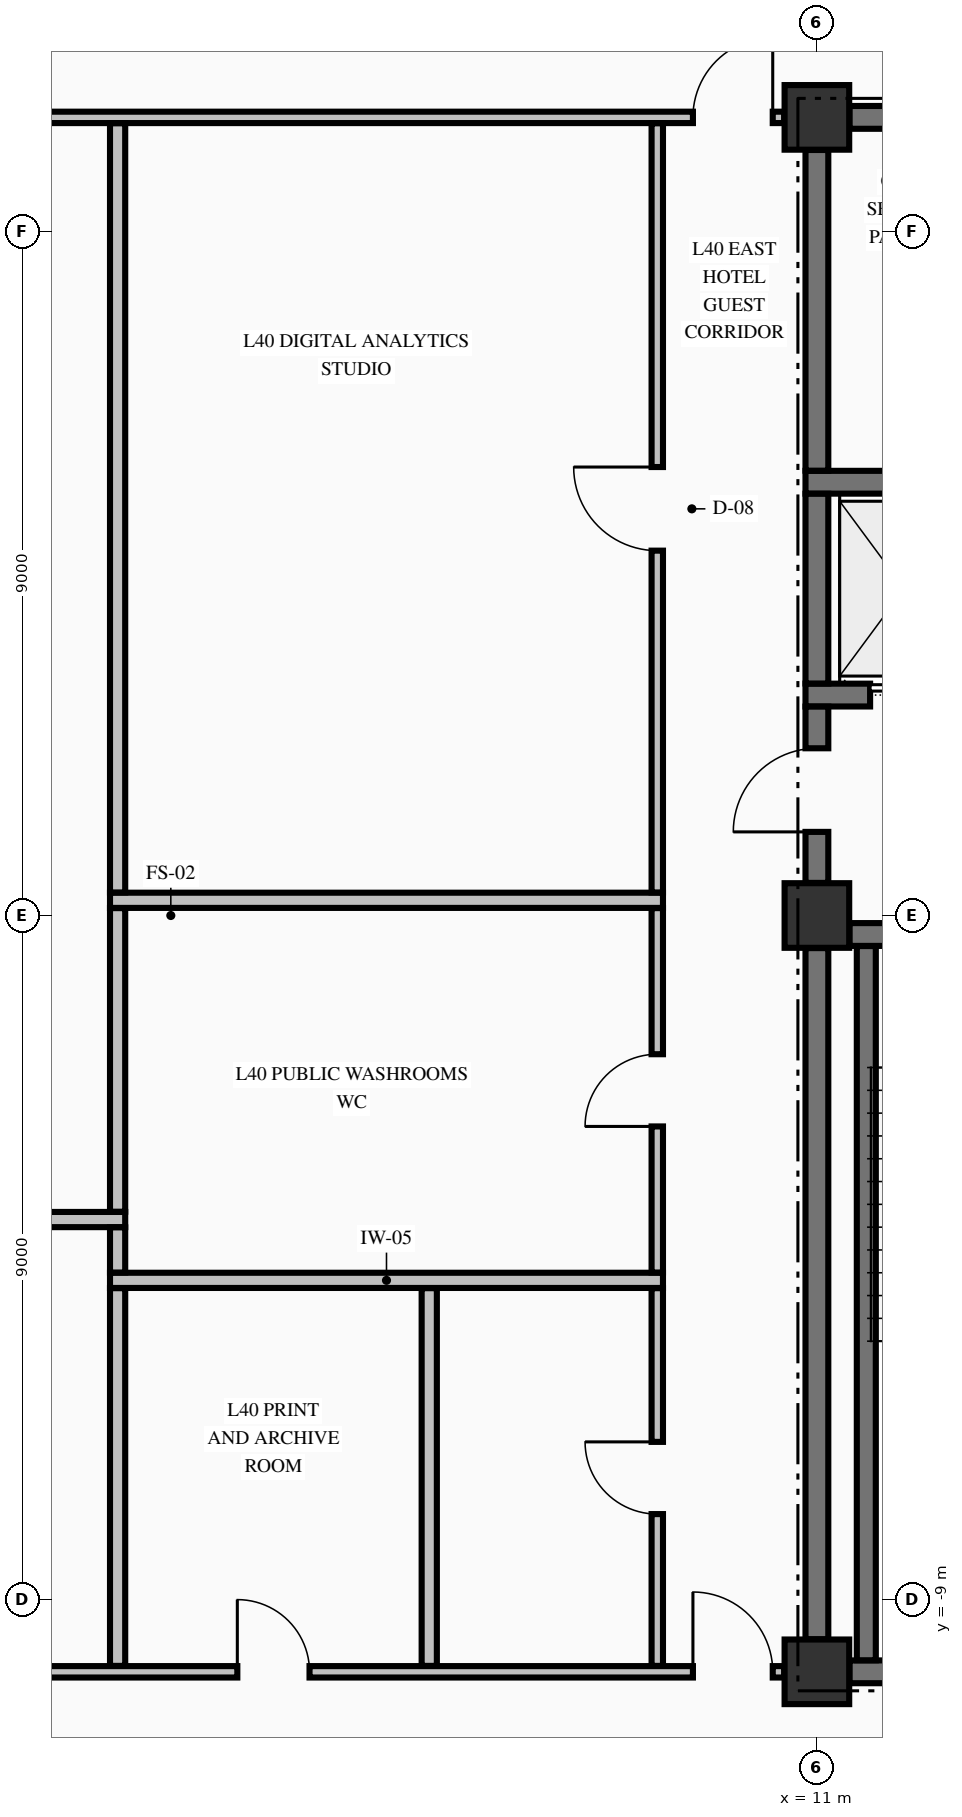
"""IFC4 building model, lengths in metres.
Left out: names, types, materials, properties, quantities, classifications, styles, units other than length and angle.
Written with IfcOpenShell. Run it as: python <this file> out.ifc"""

import sys

from ifc_helpers import new_model, si_unit, direction, frame, frame_2d, origin, origin_2d, place, context, subcontext, project, spatial, rectangle, extrude, element, fill, save


model = new_model("IFC4")
c1 = context("Model", 3, precision=1e-05, world=origin(), true_north=direction((0.0, 1.0)))
c2 = subcontext(c1, "Body", "Model", "MODEL_VIEW")
j1 = project(units=[si_unit("LENGTHUNIT", "METRE"), si_unit("PLANEANGLEUNIT", "RADIAN")], contexts=[c1])
p1 = place(None, origin())
s1 = spatial("IfcSite", under=j1, at=p1, CompositionType="ELEMENT")
p2 = place(p1, origin())
s2 = spatial("IfcBuilding", under=s1, at=p2, CompositionType="ELEMENT")
p3 = place(p2, frame((0.0, 0.0, 158.24)))
s3 = spatial("IfcBuildingStorey", under=s2, at=p3, CompositionType="ELEMENT", Elevation=158.24)
for number, where, z_axis, x_axis in (
    (1, (11.0, -9.95, -0.425), (0.0, 0.0, 1.0), (1.0, 0.0, 0.0)),
    (2, (11.0, 0.0, -0.425), (0.0, 0.0, 1.0), (1.0, 0.0, 0.0)),
    (3, (11.0, 10.5, -0.425), (0.0, 0.0, 1.0), (1.0, 0.0, 0.0)),
):
    element("IfcColumn", number, at=place(p3, frame(where, z_axis=z_axis, x_axis=x_axis)), inside=s3, PredefinedType="COLUMN", context=c2, shape_type="SweptSolid", body=[
        extrude(rectangle(XDim=0.85, YDim=0.85, at=origin_2d()), origin(), (0.0, 0.0, 1.0), 4.595),
    ])
p4 = place(p3, frame((11.429, -9.95, 0.0), z_axis=(0.0, 0.0, 1.0), x_axis=(1.0, 0.0, 0.0)))
e4 = element("IfcWall", 4, at=p4, inside=s3, PredefinedType="SHEAR", context=c2, shape_type="SweptSolid", body=[
    extrude(rectangle(XDim=3.271, YDim=0.3, at=frame_2d((1.635, 0.0))), origin(), (0.0, 0.0, 1.0), 4.17),
])
p5 = place(p3, frame((11.429, -0.25, 0.0), z_axis=(0.0, 0.0, 1.0), x_axis=(1.0, 0.0, 0.0)))
e5 = element("IfcWall", 5, at=p5, inside=s3, PredefinedType="SHEAR", context=c2, shape_type="SweptSolid", body=[
    extrude(rectangle(XDim=3.446, YDim=0.3, at=frame_2d((1.723, 0.0))), origin(), (0.0, 0.0, 1.0), 4.17),
])
p6 = place(p5, frame((1.171, 0.0, 0.0)))
e6 = element("IfcOpeningElement", 6, at=p6, cuts=e5, PredefinedType="OPENING", context=c2, shape_type="SweptSolid", body=[
    extrude(rectangle(XDim=1.1, YDim=2.15, at=frame_2d((0.55, 1.075))), frame((0.0, 0.16, 0.0), z_axis=(0.0, -1.0, 0.0), x_axis=(1.0, 0.0, 0.0)), (0.0, 0.0, 1.0), 0.32),
])
p7 = place(p3, frame((10.85, 2.9, 0.0), z_axis=(0.0, 0.0, 1.0), x_axis=(1.0, 0.0, 0.0)))
e7 = element("IfcWall", 7, at=p7, inside=s3, PredefinedType="SHEAR", context=c2, shape_type="SweptSolid", body=[
    extrude(rectangle(XDim=4.025, YDim=0.3, at=frame_2d((2.012, 0.0))), origin(), (0.0, 0.0, 1.0), 4.17),
])
p8 = place(p7, frame((0.85, 0.0, 0.0)))
e8 = element("IfcOpeningElement", 8, at=p8, cuts=e7, PredefinedType="OPENING", context=c2, shape_type="SweptSolid", body=[
    extrude(rectangle(XDim=1.1, YDim=2.2, at=frame_2d((0.55, 1.1))), frame((0.0, 0.16, 0.0), z_axis=(0.0, -1.0, 0.0), x_axis=(1.0, 0.0, 0.0)), (0.0, 0.0, 1.0), 0.32),
])
p9 = place(p3, frame((10.85, 5.7, 0.0), z_axis=(0.0, 0.0, 1.0), x_axis=(1.0, 0.0, 0.0)))
e9 = element("IfcWall", 9, at=p9, inside=s3, PredefinedType="SHEAR", context=c2, shape_type="SweptSolid", body=[
    extrude(rectangle(XDim=4.025, YDim=0.3, at=frame_2d((2.012, 0.0))), origin(), (0.0, 0.0, 1.0), 4.17),
])
p10 = place(p3, frame((11.429, 10.5, 0.0), z_axis=(0.0, 0.0, 1.0), x_axis=(1.0, 0.0, 0.0)))
e10 = element("IfcWall", 10, at=p10, inside=s3, PredefinedType="SHEAR", context=c2, shape_type="SweptSolid", body=[
    extrude(rectangle(XDim=3.271, YDim=0.3, at=frame_2d((1.635, 0.0))), origin(), (0.0, 0.0, 1.0), 4.17),
])
p11 = place(p10, frame((2.076, 0.0, 0.0)))
e11 = element("IfcOpeningElement", 11, at=p11, cuts=e10, PredefinedType="OPENING", context=c2, shape_type="SweptSolid", body=[
    extrude(rectangle(XDim=0.95, YDim=2.15, at=frame_2d((0.475, 1.075))), frame((0.0, 0.16, 0.0), z_axis=(0.0, -1.0, 0.0), x_axis=(1.0, 0.0, 0.0)), (0.0, 0.0, 1.0), 0.32),
])
p12 = place(p3, frame((-10.569, -9.95, 0.0), z_axis=(0.0, 0.0, 1.0), x_axis=(1.0, 0.0, 0.0)))
e12 = element("IfcWall", 12, at=p12, inside=s3, PredefinedType="PARTITIONING", context=c2, shape_type="SweptSolid", body=[
    extrude(rectangle(XDim=21.138, YDim=0.15, at=frame_2d((10.569, 0.0))), origin(), (0.0, 0.0, 1.0), 4.17),
])
p13 = place(p12, frame((0.15, 0.0, 0.0)))
e13 = element("IfcOpeningElement", 13, at=p13, cuts=e12, PredefinedType="OPENING", context=c2, shape_type="SweptSolid", body=[
    extrude(rectangle(XDim=1.05, YDim=2.15, at=frame_2d((0.525, 1.075))), frame((0.0, 0.085, 0.0), z_axis=(0.0, -1.0, 0.0), x_axis=(1.0, 0.0, 0.0)), (0.0, 0.0, 1.0), 0.17),
])
p14 = place(p12, frame((19.938, 0.0, 0.0)))
e14 = element("IfcOpeningElement", 14, at=p14, cuts=e12, PredefinedType="OPENING", context=c2, shape_type="SweptSolid", body=[
    extrude(rectangle(XDim=1.05, YDim=2.15, at=frame_2d((0.525, 1.075))), frame((0.0, 0.085, 0.0), z_axis=(0.0, -1.0, 0.0), x_axis=(1.0, 0.0, 0.0)), (0.0, 0.0, 1.0), 0.17),
])
p15 = place(p12, frame((13.944, 0.0, 0.0)))
e15 = element("IfcOpeningElement", 15, at=p15, cuts=e12, PredefinedType="OPENING", context=c2, shape_type="SweptSolid", body=[
    extrude(rectangle(XDim=0.95, YDim=2.15, at=frame_2d((0.475, 1.075))), frame((0.0, 0.085, 0.0), z_axis=(0.0, -1.0, 0.0), x_axis=(1.0, 0.0, 0.0)), (0.0, 0.0, 1.0), 0.17),
])
p16 = place(p3, frame((1.7, -4.8, 0.0), z_axis=(0.0, 0.0, 1.0), x_axis=(1.0, 0.0, 0.0)))
e16 = element("IfcWall", 16, at=p16, inside=s3, PredefinedType="PARTITIONING", context=c2, shape_type="SweptSolid", body=[
    extrude(rectangle(XDim=7.275, YDim=0.2, at=frame_2d((3.638, 0.0))), origin(), (0.0, 0.0, 1.0), 4.17),
])
p17 = place(p3, frame((-8.975, -4.0, 0.0), z_axis=(0.0, 0.0, 1.0), x_axis=(1.0, 0.0, 0.0)))
e17 = element("IfcWall", 17, at=p17, inside=s3, PredefinedType="PARTITIONING", context=c2, shape_type="SweptSolid", body=[
    extrude(rectangle(XDim=10.875, YDim=0.2, at=frame_2d((5.438, 0.0))), origin(), (0.0, 0.0, 1.0), 4.17),
])
p18 = place(p3, frame((1.7, 0.2, 0.0), z_axis=(0.0, 0.0, 1.0), x_axis=(1.0, 0.0, 0.0)))
e18 = element("IfcWall", 18, at=p18, inside=s3, PredefinedType="PARTITIONING", context=c2, shape_type="SweptSolid", body=[
    extrude(rectangle(XDim=7.275, YDim=0.2, at=frame_2d((3.638, 0.0))), origin(), (0.0, 0.0, 1.0), 4.17),
])
p19 = place(p3, frame((-10.569, 10.5, 0.0), z_axis=(0.0, 0.0, 1.0), x_axis=(1.0, 0.0, 0.0)))
e19 = element("IfcWall", 19, at=p19, inside=s3, PredefinedType="PARTITIONING", context=c2, shape_type="SweptSolid", body=[
    extrude(rectangle(XDim=21.138, YDim=0.15, at=frame_2d((10.569, 0.0))), origin(), (0.0, 0.0, 1.0), 4.17),
])
p20 = place(p19, frame((0.15, 0.0, 0.0)))
e20 = element("IfcOpeningElement", 20, at=p20, cuts=e19, PredefinedType="OPENING", context=c2, shape_type="SweptSolid", body=[
    extrude(rectangle(XDim=1.05, YDim=2.15, at=frame_2d((0.525, 1.075))), frame((0.0, 0.085, 0.0), z_axis=(0.0, -1.0, 0.0), x_axis=(1.0, 0.0, 0.0)), (0.0, 0.0, 1.0), 0.17),
])
p21 = place(p19, frame((19.938, 0.0, 0.0)))
e21 = element("IfcOpeningElement", 21, at=p21, cuts=e19, PredefinedType="OPENING", context=c2, shape_type="SweptSolid", body=[
    extrude(rectangle(XDim=1.05, YDim=2.15, at=frame_2d((0.525, 1.075))), frame((0.0, 0.085, 0.0), z_axis=(0.0, -1.0, 0.0), x_axis=(1.0, 0.0, 0.0)), (0.0, 0.0, 1.0), 0.17),
])
p22 = place(p3, frame((11.0, -9.521, 0.0), z_axis=(0.0, 0.0, 1.0), x_axis=(0.0, 1.0, 0.0)))
e22 = element("IfcWall", 22, at=p22, inside=s3, PredefinedType="SHEAR", context=c2, shape_type="SweptSolid", body=[
    extrude(rectangle(XDim=9.092, YDim=0.3, at=frame_2d((4.546, 0.0))), origin(), (0.0, 0.0, 1.0), 4.17),
])
p23 = place(p3, frame((11.0, 0.429, 0.0), z_axis=(0.0, 0.0, 1.0), x_axis=(0.0, 1.0, 0.0)))
e23 = element("IfcWall", 23, at=p23, inside=s3, PredefinedType="SHEAR", context=c2, shape_type="SweptSolid", body=[
    extrude(rectangle(XDim=2.319, YDim=0.3, at=frame_2d((1.16, 0.0))), origin(), (0.0, 0.0, 1.0), 4.17),
])
p24 = place(p23, frame((0.671, 0.0, 0.0)))
e24 = element("IfcOpeningElement", 24, at=p24, cuts=e23, PredefinedType="OPENING", context=c2, shape_type="SweptSolid", body=[
    extrude(rectangle(XDim=1.1, YDim=2.15, at=frame_2d((0.55, 1.075))), frame((0.0, 0.16, 0.0), z_axis=(0.0, -1.0, 0.0), x_axis=(1.0, 0.0, 0.0)), (0.0, 0.0, 1.0), 0.32),
])
p25 = place(p3, frame((11.0, 3.052, 0.0), z_axis=(0.0, 0.0, 1.0), x_axis=(0.0, 1.0, 0.0)))
e25 = element("IfcWall", 25, at=p25, inside=s3, PredefinedType="SHEAR", context=c2, shape_type="SweptSolid", body=[
    extrude(rectangle(XDim=2.496, YDim=0.3, at=frame_2d((1.248, 0.0))), origin(), (0.0, 0.0, 1.0), 4.17),
])
p26 = place(p3, frame((11.0, 5.852, 0.0), z_axis=(0.0, 0.0, 1.0), x_axis=(0.0, 1.0, 0.0)))
e26 = element("IfcWall", 26, at=p26, inside=s3, PredefinedType="SHEAR", context=c2, shape_type="SweptSolid", body=[
    extrude(rectangle(XDim=4.219, YDim=0.3, at=frame_2d((2.109, 0.0))), origin(), (0.0, 0.0, 1.0), 4.17),
])
p27 = place(p3, frame((11.65, -9.798, 0.0), z_axis=(0.0, 0.0, 1.0), x_axis=(0.0, 1.0, 0.0)))
e27 = element("IfcWall", 27, at=p27, inside=s3, PredefinedType="SOLIDWALL", context=c2, shape_type="SweptSolid", body=[
    extrude(rectangle(XDim=9.396, YDim=0.25, at=frame_2d((4.698, 0.0))), origin(), (0.0, 0.0, 1.0), 4.17),
])
p28 = place(p3, frame((1.8, -9.872, 0.0), z_axis=(0.0, 0.0, 1.0), x_axis=(0.0, 1.0, 0.0)))
e28 = element("IfcWall", 28, at=p28, inside=s3, PredefinedType="PARTITIONING", context=c2, shape_type="SweptSolid", body=[
    extrude(rectangle(XDim=4.969, YDim=0.2, at=frame_2d((2.484, 0.0))), origin(), (0.0, 0.0, 1.0), 4.17),
])
p29 = place(p3, frame((1.8, -4.697, 0.0), z_axis=(0.0, 0.0, 1.0), x_axis=(0.0, 1.0, 0.0)))
e29 = element("IfcWall", 29, at=p29, inside=s3, PredefinedType="PARTITIONING", context=c2, shape_type="SweptSolid", body=[
    extrude(rectangle(XDim=0.594, YDim=0.2, at=frame_2d((0.297, 0.0))), origin(), (0.0, 0.0, 1.0), 4.17),
])
p30 = place(p3, frame((1.8, -3.897, 0.0), z_axis=(0.0, 0.0, 1.0), x_axis=(0.0, 1.0, 0.0)))
e30 = element("IfcWall", 30, at=p30, inside=s3, PredefinedType="PARTITIONING", context=c2, shape_type="SweptSolid", body=[
    extrude(rectangle(XDim=3.994, YDim=0.2, at=frame_2d((1.997, 0.0))), origin(), (0.0, 0.0, 1.0), 4.17),
])
p31 = place(p3, frame((1.8, 0.303, 0.0), z_axis=(0.0, 0.0, 1.0), x_axis=(0.0, 1.0, 0.0)))
e31 = element("IfcWall", 31, at=p31, inside=s3, PredefinedType="PARTITIONING", context=c2, shape_type="SweptSolid", body=[
    extrude(rectangle(XDim=10.119, YDim=0.2, at=frame_2d((5.06, 0.0))), origin(), (0.0, 0.0, 1.0), 4.17),
])
p32 = place(p3, frame((5.9, -9.872, 0.0), z_axis=(0.0, 0.0, 1.0), x_axis=(0.0, 1.0, 0.0)))
e32 = element("IfcWall", 32, at=p32, inside=s3, PredefinedType="PARTITIONING", context=c2, shape_type="SweptSolid", body=[
    extrude(rectangle(XDim=4.969, YDim=0.2, at=frame_2d((2.484, 0.0))), origin(), (0.0, 0.0, 1.0), 4.17),
])
p33 = place(p3, frame((8.9, -9.872, 0.0), z_axis=(0.0, 0.0, 1.0), x_axis=(0.0, 1.0, 0.0)))
e33 = element("IfcWall", 33, at=p33, inside=s3, PredefinedType="PARTITIONING", context=c2, shape_type="SweptSolid", body=[
    extrude(rectangle(XDim=4.969, YDim=0.15, at=frame_2d((2.484, 0.0))), origin(), (0.0, 0.0, 1.0), 4.17),
])
p34 = place(p33, frame((1.997, 0.0, 0.0)))
e34 = element("IfcOpeningElement", 34, at=p34, cuts=e33, PredefinedType="OPENING", context=c2, shape_type="SweptSolid", body=[
    extrude(rectangle(XDim=0.95, YDim=2.15, at=frame_2d((0.475, 1.075))), frame((0.0, 0.085, 0.0), z_axis=(0.0, -1.0, 0.0), x_axis=(1.0, 0.0, 0.0)), (0.0, 0.0, 1.0), 0.17),
])
p35 = place(p3, frame((8.9, -4.697, 0.0), z_axis=(0.0, 0.0, 1.0), x_axis=(0.0, 1.0, 0.0)))
e35 = element("IfcWall", 35, at=p35, inside=s3, PredefinedType="PARTITIONING", context=c2, shape_type="SweptSolid", body=[
    extrude(rectangle(XDim=4.794, YDim=0.15, at=frame_2d((2.397, 0.0))), origin(), (0.0, 0.0, 1.0), 4.17),
])
p36 = place(p35, frame((1.922, 0.0, 0.0)))
e36 = element("IfcOpeningElement", 36, at=p36, cuts=e35, PredefinedType="OPENING", context=c2, shape_type="SweptSolid", body=[
    extrude(rectangle(XDim=0.95, YDim=2.15, at=frame_2d((0.475, 1.075))), frame((0.0, 0.085, 0.0), z_axis=(0.0, -1.0, 0.0), x_axis=(1.0, 0.0, 0.0)), (0.0, 0.0, 1.0), 0.17),
])
p37 = place(p3, frame((8.9, 0.303, 0.0), z_axis=(0.0, 0.0, 1.0), x_axis=(0.0, 1.0, 0.0)))
e37 = element("IfcWall", 37, at=p37, inside=s3, PredefinedType="PARTITIONING", context=c2, shape_type="SweptSolid", body=[
    extrude(rectangle(XDim=10.119, YDim=0.15, at=frame_2d((5.06, 0.0))), origin(), (0.0, 0.0, 1.0), 4.17),
])
p38 = place(p37, frame((4.497, 0.0, 0.0)))
e38 = element("IfcOpeningElement", 38, at=p38, cuts=e37, PredefinedType="OPENING", context=c2, shape_type="SweptSolid", body=[
    extrude(rectangle(XDim=1.1, YDim=2.15, at=frame_2d((0.55, 1.075))), frame((0.0, 0.085, 0.0), z_axis=(0.0, -1.0, 0.0), x_axis=(1.0, 0.0, 0.0)), (0.0, 0.0, 1.0), 0.17),
])
p39 = place(p24, origin())
e39 = element("IfcDoor", 39, at=p39, inside=s3, OperationType="SINGLE_SWING_LEFT", PredefinedType="DOOR", context=c2, shape_type="SweptSolid", body=[
    extrude(rectangle(XDim=1.1, YDim=2.15, at=frame_2d((0.55, 1.075))), frame((0.0, 0.025, 0.0), z_axis=(0.0, -1.0, 0.0), x_axis=(1.0, 0.0, 0.0)), (0.0, 0.0, 1.0), 0.05),
])
fill(e24, e39)
p40 = place(p8, origin())
e40 = element("IfcDoor", 40, at=p40, inside=s3, OperationType="SLIDING_TO_RIGHT", PredefinedType="DOOR", context=c2, shape_type="SweptSolid", body=[
    extrude(rectangle(XDim=1.1, YDim=2.2, at=frame_2d((0.55, 1.1))), frame((0.0, 0.025, 0.0), z_axis=(0.0, -1.0, 0.0), x_axis=(1.0, 0.0, 0.0)), (0.0, 0.0, 1.0), 0.05),
])
fill(e8, e40)
p41 = place(p21, origin())
e41 = element("IfcDoor", 41, at=p41, inside=s3, OperationType="SINGLE_SWING_RIGHT", PredefinedType="DOOR", context=c2, shape_type="SweptSolid", body=[
    extrude(rectangle(XDim=1.05, YDim=2.15, at=frame_2d((0.525, 1.075))), frame((0.0, 0.025, 0.0), z_axis=(0.0, -1.0, 0.0), x_axis=(1.0, 0.0, 0.0)), (0.0, 0.0, 1.0), 0.05),
])
fill(e21, e41)
p42 = place(p14, origin())
e42 = element("IfcDoor", 42, at=p42, inside=s3, OperationType="SINGLE_SWING_LEFT", PredefinedType="DOOR", context=c2, shape_type="SweptSolid", body=[
    extrude(rectangle(XDim=1.05, YDim=2.15, at=frame_2d((0.525, 1.075))), frame((0.0, 0.025, 0.0), z_axis=(0.0, -1.0, 0.0), x_axis=(1.0, 0.0, 0.0)), (0.0, 0.0, 1.0), 0.05),
])
fill(e14, e42)
p43 = place(p38, origin())
e43 = element("IfcDoor", 43, at=p43, inside=s3, OperationType="SINGLE_SWING_RIGHT", PredefinedType="DOOR", context=c2, shape_type="SweptSolid", body=[
    extrude(rectangle(XDim=1.1, YDim=2.15, at=frame_2d((0.55, 1.075))), frame((0.0, 0.025, 0.0), z_axis=(0.0, -1.0, 0.0), x_axis=(1.0, 0.0, 0.0)), (0.0, 0.0, 1.0), 0.05),
])
fill(e38, e43)
p44 = place(p36, origin())
e44 = element("IfcDoor", 44, at=p44, inside=s3, OperationType="SINGLE_SWING_LEFT", PredefinedType="DOOR", context=c2, shape_type="SweptSolid", body=[
    extrude(rectangle(XDim=0.95, YDim=2.15, at=frame_2d((0.475, 1.075))), frame((0.0, 0.025, 0.0), z_axis=(0.0, -1.0, 0.0), x_axis=(1.0, 0.0, 0.0)), (0.0, 0.0, 1.0), 0.05),
])
fill(e36, e44)
p45 = place(p34, origin())
e45 = element("IfcDoor", 45, at=p45, inside=s3, OperationType="SINGLE_SWING_RIGHT", PredefinedType="DOOR", context=c2, shape_type="SweptSolid", body=[
    extrude(rectangle(XDim=0.95, YDim=2.15, at=frame_2d((0.475, 1.075))), frame((0.0, 0.025, 0.0), z_axis=(0.0, -1.0, 0.0), x_axis=(1.0, 0.0, 0.0)), (0.0, 0.0, 1.0), 0.05),
])
fill(e34, e45)
p46 = place(p15, origin())
e46 = element("IfcDoor", 46, at=p46, inside=s3, OperationType="SINGLE_SWING_LEFT", PredefinedType="DOOR", context=c2, shape_type="SweptSolid", body=[
    extrude(rectangle(XDim=0.95, YDim=2.15, at=frame_2d((0.475, 1.075))), frame((0.0, 0.025, 0.0), z_axis=(0.0, -1.0, 0.0), x_axis=(1.0, 0.0, 0.0)), (0.0, 0.0, 1.0), 0.05),
])
fill(e15, e46)
save(model, sys.argv[1])
